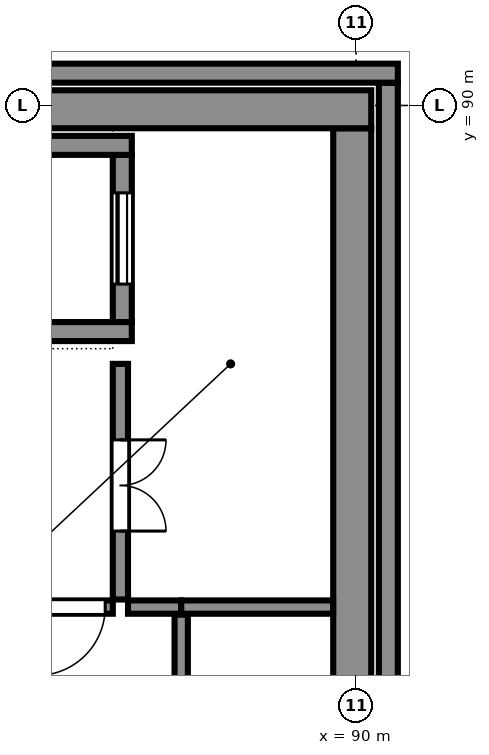
"""IFC4 building model, lengths in metres.
Left out: names, types, materials, properties, quantities, classifications, styles, units other than length and angle.
Written with IfcOpenShell. Run it as: python <this file> out.ifc"""

import sys

from ifc_helpers import new_model, si_unit, direction, frame, frame_2d, origin, place, context, subcontext, project, spatial, polyline, rectangle, outline, extrude, element, fill, save


model = new_model("IFC4")
c1 = context("Model", 3, precision=1e-05, world=origin(), true_north=direction((0.0, 1.0)))
c2 = subcontext(c1, "Body", "Model", "MODEL_VIEW")
j1 = project(units=[si_unit("LENGTHUNIT", "METRE"), si_unit("PLANEANGLEUNIT", "RADIAN")], contexts=[c1])
p1 = place(None, origin())
s1 = spatial("IfcSite", under=j1, at=p1, CompositionType="ELEMENT")
p2 = place(p1, origin())
s2 = spatial("IfcBuilding", under=s1, at=p2, CompositionType="ELEMENT")
p3 = place(p2, frame((0.0, 0.0, 11.7)))
s3 = spatial("IfcBuildingStorey", under=s2, at=p3, CompositionType="ELEMENT", Elevation=11.7)
p4 = place(p3, frame((71.8, 89.95, 0.0), z_axis=(0.0, 0.0, 1.0), x_axis=(1.0, 0.0, 0.0)))
e1 = element("IfcWall", 1, at=p4, inside=s3, PredefinedType="SOLIDWALL", context=c2, shape_type="SweptSolid", body=[
    extrude(rectangle(XDim=18.4, YDim=0.5, at=frame_2d((9.2, 0.0))), origin(), (0.0, 0.0, 1.0), 4.2),
])
p5 = place(p3, frame((89.95, 81.3, 0.0), z_axis=(0.0, 0.0, 1.0), x_axis=(0.0, 1.0, 0.0)))
e2 = element("IfcWall", 2, at=p5, inside=s3, PredefinedType="SOLIDWALL", context=c2, shape_type="SweptSolid", body=[
    extrude(rectangle(XDim=8.4, YDim=0.5, at=frame_2d((4.2, 0.0))), origin(), (0.0, 0.0, 1.0), 4.2),
])
p6 = place(p3, frame((71.45, 90.425, 0.0), z_axis=(0.0, 0.0, 1.0), x_axis=(1.0, 0.0, 0.0)))
e3 = element("IfcWall", 3, at=p6, inside=s3, PredefinedType="SOLIDWALL", context=c2, shape_type="SweptSolid", body=[
    extrude(outline(polyline([(0.0, 0.0), (19.1, 0.0), (19.1, 12.6), (0.0, 12.6), (0.0, 0.0)]), holes=[polyline([(1.308, 2.439), (1.352, 2.546), (1.408, 2.646), (1.475, 2.74), (1.552, 2.826), (1.638, 2.903), (1.732, 2.969), (1.833, 3.025), (1.939, 3.068), (2.05, 3.1), (2.161, 3.068), (2.267, 3.025), (2.368, 2.969), (2.462, 2.903), (2.549, 2.826), (2.625, 2.74), (2.692, 2.646), (2.748, 2.546), (2.792, 2.439), (2.824, 2.329), (2.844, 2.215), (2.85, 2.1), (2.85, 0.6), (1.25, 0.6), (1.25, 2.1), (1.257, 2.215), (1.276, 2.329), (1.308, 2.439)]), polyline([(4.308, 2.439), (4.352, 2.546), (4.408, 2.646), (4.475, 2.74), (4.552, 2.826), (4.638, 2.903), (4.732, 2.969), (4.833, 3.025), (4.939, 3.068), (5.05, 3.1), (5.161, 3.068), (5.267, 3.025), (5.368, 2.969), (5.462, 2.903), (5.549, 2.826), (5.625, 2.74), (5.692, 2.646), (5.748, 2.546), (5.792, 2.439), (5.824, 2.329), (5.844, 2.215), (5.85, 2.1), (5.85, 0.6), (4.25, 0.6), (4.25, 2.1), (4.257, 2.215), (4.276, 2.329), (4.308, 2.439)]), polyline([(7.308, 2.439), (7.352, 2.546), (7.408, 2.646), (7.475, 2.74), (7.552, 2.826), (7.638, 2.903), (7.732, 2.969), (7.833, 3.025), (7.939, 3.068), (8.05, 3.1), (8.161, 3.068), (8.267, 3.025), (8.368, 2.969), (8.462, 2.903), (8.549, 2.826), (8.625, 2.74), (8.692, 2.646), (8.748, 2.546), (8.792, 2.439), (8.824, 2.329), (8.844, 2.215), (8.85, 2.1), (8.85, 0.6), (7.25, 0.6), (7.25, 2.1), (7.257, 2.215), (7.276, 2.329), (7.308, 2.439)]), polyline([(1.308, 6.639), (1.352, 6.746), (1.408, 6.846), (1.475, 6.94), (1.552, 7.026), (1.638, 7.103), (1.732, 7.169), (1.833, 7.225), (1.939, 7.269), (2.05, 7.3), (2.161, 7.269), (2.267, 7.225), (2.368, 7.169), (2.462, 7.103), (2.549, 7.026), (2.625, 6.94), (2.692, 6.846), (2.748, 6.746), (2.792, 6.639), (2.824, 6.529), (2.844, 6.415), (2.85, 6.3), (2.85, 4.8), (1.25, 4.8), (1.25, 6.3), (1.257, 6.415), (1.276, 6.529), (1.308, 6.639)]), polyline([(4.308, 6.639), (4.352, 6.746), (4.408, 6.846), (4.475, 6.94), (4.552, 7.026), (4.638, 7.103), (4.732, 7.169), (4.833, 7.225), (4.939, 7.269), (5.05, 7.3), (5.161, 7.269), (5.267, 7.225), (5.368, 7.169), (5.462, 7.103), (5.549, 7.026), (5.625, 6.94), (5.692, 6.846), (5.748, 6.746), (5.792, 6.639), (5.824, 6.529), (5.844, 6.415), (5.85, 6.3), (5.85, 4.8), (4.25, 4.8), (4.25, 6.3), (4.257, 6.415), (4.276, 6.529), (4.308, 6.639)]), polyline([(7.308, 6.639), (7.352, 6.746), (7.408, 6.846), (7.475, 6.94), (7.552, 7.026), (7.638, 7.103), (7.732, 7.169), (7.833, 7.225), (7.939, 7.269), (8.05, 7.3), (8.161, 7.269), (8.267, 7.225), (8.368, 7.169), (8.462, 7.103), (8.549, 7.026), (8.625, 6.94), (8.692, 6.846), (8.748, 6.746), (8.792, 6.639), (8.824, 6.529), (8.844, 6.415), (8.85, 6.3), (8.85, 4.8), (7.25, 4.8), (7.25, 6.3), (7.257, 6.415), (7.276, 6.529), (7.308, 6.639)]), polyline([(1.308, 10.839), (1.352, 10.946), (1.408, 11.046), (1.475, 11.14), (1.552, 11.226), (1.638, 11.303), (1.732, 11.369), (1.833, 11.425), (1.939, 11.469), (2.05, 11.5), (2.161, 11.469), (2.267, 11.425), (2.368, 11.369), (2.462, 11.303), (2.549, 11.226), (2.625, 11.14), (2.692, 11.046), (2.748, 10.946), (2.792, 10.839), (2.824, 10.729), (2.844, 10.615), (2.85, 10.5), (2.85, 9.0), (1.25, 9.0), (1.25, 10.5), (1.257, 10.615), (1.276, 10.729), (1.308, 10.839)]), polyline([(4.352, 10.946), (4.408, 11.046), (4.475, 11.14), (4.552, 11.226), (4.638, 11.303), (4.732, 11.369), (4.833, 11.425), (4.939, 11.469), (5.05, 11.5), (5.161, 11.469), (5.267, 11.425), (5.368, 11.369), (5.462, 11.303), (5.549, 11.226), (5.625, 11.14), (5.692, 11.046), (5.748, 10.946), (5.792, 10.839), (5.824, 10.729), (5.844, 10.615), (5.85, 10.5), (5.85, 9.0), (4.25, 9.0), (4.25, 10.5), (4.257, 10.615), (4.276, 10.729), (4.308, 10.839), (4.352, 10.946)]), polyline([(7.352, 10.946), (7.408, 11.046), (7.475, 11.14), (7.552, 11.226), (7.638, 11.303), (7.732, 11.369), (7.833, 11.425), (7.939, 11.469), (8.05, 11.5), (8.161, 11.469), (8.267, 11.425), (8.368, 11.369), (8.462, 11.303), (8.549, 11.226), (8.625, 11.14), (8.692, 11.046), (8.748, 10.946), (8.792, 10.839), (8.824, 10.729), (8.844, 10.615), (8.85, 10.5), (8.85, 9.0), (7.25, 9.0), (7.25, 10.5), (7.257, 10.615), (7.276, 10.729), (7.308, 10.839), (7.352, 10.946)]), polyline([(10.308, 2.439), (10.352, 2.546), (10.408, 2.646), (10.475, 2.74), (10.552, 2.826), (10.638, 2.903), (10.732, 2.969), (10.833, 3.025), (10.939, 3.068), (11.05, 3.1), (11.161, 3.068), (11.267, 3.025), (11.368, 2.969), (11.462, 2.903), (11.549, 2.826), (11.625, 2.74), (11.692, 2.646), (11.748, 2.546), (11.792, 2.439), (11.824, 2.329), (11.844, 2.215), (11.85, 2.1), (11.85, 0.6), (10.25, 0.6), (10.25, 2.1), (10.257, 2.215), (10.276, 2.329), (10.308, 2.439)]), polyline([(13.308, 2.439), (13.352, 2.546), (13.408, 2.646), (13.475, 2.74), (13.552, 2.826), (13.638, 2.903), (13.732, 2.969), (13.833, 3.025), (13.939, 3.068), (14.05, 3.1), (14.161, 3.068), (14.267, 3.025), (14.368, 2.969), (14.462, 2.903), (14.549, 2.826), (14.625, 2.74), (14.692, 2.646), (14.748, 2.546), (14.792, 2.439), (14.824, 2.329), (14.844, 2.215), (14.85, 2.1), (14.85, 0.6), (13.25, 0.6), (13.25, 2.1), (13.257, 2.215), (13.276, 2.329), (13.308, 2.439)]), polyline([(16.308, 2.439), (16.352, 2.546), (16.408, 2.646), (16.475, 2.74), (16.552, 2.826), (16.638, 2.903), (16.732, 2.969), (16.833, 3.025), (16.939, 3.068), (17.05, 3.1), (17.161, 3.068), (17.267, 3.025), (17.368, 2.969), (17.462, 2.903), (17.549, 2.826), (17.625, 2.74), (17.692, 2.646), (17.748, 2.546), (17.792, 2.439), (17.824, 2.329), (17.844, 2.215), (17.85, 2.1), (17.85, 0.6), (16.25, 0.6), (16.25, 2.1), (16.257, 2.215), (16.276, 2.329), (16.308, 2.439)]), polyline([(10.308, 6.639), (10.352, 6.746), (10.408, 6.846), (10.475, 6.94), (10.552, 7.026), (10.638, 7.103), (10.732, 7.169), (10.833, 7.225), (10.939, 7.269), (11.05, 7.3), (11.161, 7.269), (11.267, 7.225), (11.368, 7.169), (11.462, 7.103), (11.549, 7.026), (11.625, 6.94), (11.692, 6.846), (11.748, 6.746), (11.792, 6.639), (11.824, 6.529), (11.844, 6.415), (11.85, 6.3), (11.85, 4.8), (10.25, 4.8), (10.25, 6.3), (10.257, 6.415), (10.276, 6.529), (10.308, 6.639)]), polyline([(13.308, 6.639), (13.352, 6.746), (13.408, 6.846), (13.475, 6.94), (13.552, 7.026), (13.638, 7.103), (13.732, 7.169), (13.833, 7.225), (13.939, 7.269), (14.05, 7.3), (14.161, 7.269), (14.267, 7.225), (14.368, 7.169), (14.462, 7.103), (14.549, 7.026), (14.625, 6.94), (14.692, 6.846), (14.748, 6.746), (14.792, 6.639), (14.824, 6.529), (14.844, 6.415), (14.85, 6.3), (14.85, 4.8), (13.25, 4.8), (13.25, 6.3), (13.257, 6.415), (13.276, 6.529), (13.308, 6.639)]), polyline([(16.308, 6.639), (16.352, 6.746), (16.408, 6.846), (16.475, 6.94), (16.552, 7.026), (16.638, 7.103), (16.732, 7.169), (16.833, 7.225), (16.939, 7.269), (17.05, 7.3), (17.161, 7.269), (17.267, 7.225), (17.368, 7.169), (17.462, 7.103), (17.549, 7.026), (17.625, 6.94), (17.692, 6.846), (17.748, 6.746), (17.792, 6.639), (17.824, 6.529), (17.844, 6.415), (17.85, 6.3), (17.85, 4.8), (16.25, 4.8), (16.25, 6.3), (16.257, 6.415), (16.276, 6.529), (16.308, 6.639)]), polyline([(10.308, 10.839), (10.352, 10.946), (10.408, 11.046), (10.475, 11.14), (10.552, 11.226), (10.638, 11.303), (10.732, 11.369), (10.833, 11.425), (10.939, 11.469), (11.05, 11.5), (11.161, 11.469), (11.267, 11.425), (11.368, 11.369), (11.462, 11.303), (11.549, 11.226), (11.625, 11.14), (11.692, 11.046), (11.748, 10.946), (11.792, 10.839), (11.824, 10.729), (11.844, 10.615), (11.85, 10.5), (11.85, 9.0), (10.25, 9.0), (10.25, 10.5), (10.257, 10.615), (10.276, 10.729), (10.308, 10.839)]), polyline([(13.352, 10.946), (13.408, 11.046), (13.475, 11.14), (13.552, 11.226), (13.638, 11.303), (13.732, 11.369), (13.833, 11.425), (13.939, 11.469), (14.05, 11.5), (14.161, 11.469), (14.267, 11.425), (14.368, 11.369), (14.462, 11.303), (14.549, 11.226), (14.625, 11.14), (14.692, 11.046), (14.748, 10.946), (14.792, 10.839), (14.824, 10.729), (14.844, 10.615), (14.85, 10.5), (14.85, 9.0), (13.25, 9.0), (13.25, 10.5), (13.257, 10.615), (13.276, 10.729), (13.308, 10.839), (13.352, 10.946)]), polyline([(16.352, 10.946), (16.408, 11.046), (16.475, 11.14), (16.552, 11.226), (16.638, 11.303), (16.732, 11.369), (16.833, 11.425), (16.939, 11.469), (17.05, 11.5), (17.161, 11.469), (17.267, 11.425), (17.368, 11.369), (17.462, 11.303), (17.549, 11.226), (17.625, 11.14), (17.692, 11.046), (17.748, 10.946), (17.792, 10.839), (17.824, 10.729), (17.844, 10.615), (17.85, 10.5), (17.85, 9.0), (16.25, 9.0), (16.25, 10.5), (16.257, 10.615), (16.276, 10.729), (16.308, 10.839), (16.352, 10.946)])]), frame((0.0, 0.125, 0.0), z_axis=(0.0, -1.0, 0.0), x_axis=(1.0, 0.0, 0.0)), (0.0, 0.0, 1.0), 0.25),
])
p7 = place(p3, frame((90.425, 81.6, 0.0), z_axis=(0.0, 0.0, 1.0), x_axis=(0.0, 1.0, 0.0)))
e4 = element("IfcWall", 4, at=p7, inside=s3, PredefinedType="SOLIDWALL", context=c2, shape_type="SweptSolid", body=[
    extrude(outline(polyline([(0.0, 0.0), (8.7, 0.0), (8.7, 12.6), (0.0, 12.6), (0.0, 0.0)]), holes=[polyline([(2.056, 2.215), (2.076, 2.329), (2.108, 2.439), (2.152, 2.546), (2.208, 2.646), (2.275, 2.74), (2.352, 2.826), (2.438, 2.903), (2.532, 2.969), (2.633, 3.025), (2.739, 3.068), (2.85, 3.1), (2.961, 3.068), (3.067, 3.025), (3.168, 2.969), (3.262, 2.903), (3.348, 2.826), (3.425, 2.74), (3.492, 2.646), (3.548, 2.546), (3.592, 2.439), (3.624, 2.329), (3.644, 2.215), (3.65, 2.1), (3.65, 0.6), (2.05, 0.6), (2.05, 2.1), (2.056, 2.215)]), polyline([(5.076, 2.329), (5.108, 2.439), (5.152, 2.546), (5.208, 2.646), (5.275, 2.74), (5.352, 2.826), (5.438, 2.903), (5.532, 2.969), (5.633, 3.025), (5.739, 3.068), (5.85, 3.1), (5.961, 3.068), (6.067, 3.025), (6.168, 2.969), (6.262, 2.903), (6.348, 2.826), (6.425, 2.74), (6.492, 2.646), (6.548, 2.546), (6.592, 2.439), (6.624, 2.329), (6.644, 2.215), (6.65, 2.1), (6.65, 0.6), (5.05, 0.6), (5.05, 2.1), (5.056, 2.215), (5.076, 2.329)]), polyline([(2.076, 6.529), (2.108, 6.639), (2.152, 6.746), (2.208, 6.846), (2.275, 6.94), (2.352, 7.026), (2.438, 7.103), (2.532, 7.169), (2.633, 7.225), (2.739, 7.269), (2.85, 7.3), (2.961, 7.269), (3.067, 7.225), (3.168, 7.169), (3.262, 7.103), (3.348, 7.026), (3.425, 6.94), (3.492, 6.846), (3.548, 6.746), (3.592, 6.639), (3.624, 6.529), (3.644, 6.415), (3.65, 6.3), (3.65, 4.8), (2.05, 4.8), (2.05, 6.3), (2.056, 6.415), (2.076, 6.529)]), polyline([(5.056, 6.415), (5.076, 6.529), (5.108, 6.639), (5.152, 6.746), (5.208, 6.846), (5.275, 6.94), (5.352, 7.026), (5.438, 7.103), (5.532, 7.169), (5.633, 7.225), (5.739, 7.269), (5.85, 7.3), (5.961, 7.269), (6.067, 7.225), (6.168, 7.169), (6.262, 7.103), (6.348, 7.026), (6.425, 6.94), (6.492, 6.846), (6.548, 6.746), (6.592, 6.639), (6.624, 6.529), (6.644, 6.415), (6.65, 6.3), (6.65, 4.8), (5.05, 4.8), (5.05, 6.3), (5.056, 6.415)]), polyline([(2.076, 10.729), (2.108, 10.839), (2.152, 10.946), (2.208, 11.046), (2.275, 11.14), (2.352, 11.226), (2.438, 11.303), (2.532, 11.369), (2.633, 11.425), (2.739, 11.469), (2.85, 11.5), (2.961, 11.469), (3.067, 11.425), (3.168, 11.369), (3.262, 11.303), (3.348, 11.226), (3.425, 11.14), (3.492, 11.046), (3.548, 10.946), (3.592, 10.839), (3.624, 10.729), (3.644, 10.615), (3.65, 10.5), (3.65, 9.0), (2.05, 9.0), (2.05, 10.5), (2.056, 10.615), (2.076, 10.729)]), polyline([(5.076, 10.729), (5.108, 10.839), (5.152, 10.946), (5.208, 11.046), (5.275, 11.14), (5.352, 11.226), (5.438, 11.303), (5.532, 11.369), (5.633, 11.425), (5.739, 11.469), (5.85, 11.5), (5.961, 11.469), (6.067, 11.425), (6.168, 11.369), (6.262, 11.303), (6.348, 11.226), (6.425, 11.14), (6.492, 11.046), (6.548, 10.946), (6.592, 10.839), (6.624, 10.729), (6.644, 10.615), (6.65, 10.5), (6.65, 9.0), (5.05, 9.0), (5.05, 10.5), (5.056, 10.615), (5.076, 10.729)])]), frame((0.0, 0.125, 0.0), z_axis=(0.0, -1.0, 0.0), x_axis=(1.0, 0.0, 0.0)), (0.0, 0.0, 1.0), 0.25),
])
for number, where, z_axis, x_axis in (
    (5, (83.65, 87.025, 0.0), (0.0, 0.0, 1.0), (1.0, 0.0, 0.0)),
    (6, (83.65, 89.475, 0.0), (0.0, 0.0, 1.0), (1.0, 0.0, 0.0)),
):
    element("IfcWall", number, at=place(p3, frame(where, z_axis=z_axis, x_axis=x_axis)), inside=s3, PredefinedType="SOLIDWALL", context=c2, shape_type="SweptSolid", body=[
        extrude(rectangle(XDim=3.4, YDim=0.25, at=frame_2d((1.7, 0.0))), origin(), (0.0, 0.0, 1.0), 3.516),
    ])
p8 = place(p3, frame((86.925, 87.15, 0.0), z_axis=(0.0, 0.0, 1.0), x_axis=(0.0, 1.0, 0.0)))
e7 = element("IfcWall", 7, at=p8, inside=s3, PredefinedType="SOLIDWALL", context=c2, shape_type="SweptSolid", body=[
    extrude(rectangle(XDim=2.2, YDim=0.25, at=frame_2d((1.1, 0.0))), origin(), (0.0, 0.0, 1.0), 3.516),
])
p9 = place(p8, frame((0.5, 0.0, 0.0)))
e8 = element("IfcOpeningElement", 8, at=p9, cuts=e7, PredefinedType="OPENING", context=c2, shape_type="SweptSolid", body=[
    extrude(rectangle(XDim=1.2, YDim=2.1, at=frame_2d((0.6, 1.05))), frame((0.0, 0.135, 0.0), z_axis=(0.0, -1.0, 0.0), x_axis=(1.0, 0.0, 0.0)), (0.0, 0.0, 1.0), 0.27),
])
p10 = place(p3, frame((86.8, 83.4, 0.0), z_axis=(0.0, 0.0, 1.0), x_axis=(-1.0, 0.0, 0.0)))
e9 = element("IfcWall", 9, at=p10, inside=s3, PredefinedType="PARTITIONING", context=c2, shape_type="SweptSolid", body=[
    extrude(rectangle(XDim=1.1, YDim=0.175, at=frame_2d((0.55, 0.0))), origin(), (0.0, 0.0, 1.0), 3.307),
])
p11 = place(p10, frame((0.1, 0.0, 0.0)))
e10 = element("IfcOpeningElement", 10, at=p11, cuts=e9, PredefinedType="OPENING", context=c2, shape_type="SweptSolid", body=[
    extrude(rectangle(XDim=0.9, YDim=2.1, at=frame_2d((0.45, 1.05))), frame((0.0, 0.097, 0.0), z_axis=(0.0, -1.0, 0.0), x_axis=(1.0, 0.0, 0.0)), (0.0, 0.0, 1.0), 0.195),
])
p12 = place(p3, frame((86.9, 86.6, 0.0), z_axis=(0.0, 0.0, 1.0), x_axis=(0.0, -1.0, 0.0)))
e11 = element("IfcWall", 11, at=p12, inside=s3, PredefinedType="PARTITIONING", context=c2, shape_type="SweptSolid", body=[
    extrude(rectangle(XDim=3.1, YDim=0.2, at=frame_2d((1.55, 0.0))), origin(), (0.0, 0.0, 1.0), 3.382),
])
p13 = place(p12, frame((1.0, 0.0, 0.0)))
e12 = element("IfcOpeningElement", 12, at=p13, cuts=e11, PredefinedType="OPENING", context=c2, shape_type="SweptSolid", body=[
    extrude(rectangle(XDim=1.2, YDim=2.1, at=frame_2d((0.6, 1.05))), frame((0.0, 0.11, 0.0), z_axis=(0.0, -1.0, 0.0), x_axis=(1.0, 0.0, 0.0)), (0.0, 0.0, 1.0), 0.22),
])
p14 = place(p3, frame((87.7, 83.4, 0.0), z_axis=(0.0, 0.0, 1.0), x_axis=(-1.0, 0.0, 0.0)))
e13 = element("IfcWall", 13, at=p14, inside=s3, PredefinedType="PARTITIONING", context=c2, shape_type="SweptSolid", body=[
    extrude(rectangle(XDim=0.7, YDim=0.175, at=frame_2d((0.35, 0.0))), origin(), (0.0, 0.0, 1.0), 3.307),
])
for number, where, z_axis, x_axis in (
    (14, (89.698, 83.4, 0.0), (0.0, 0.0, 1.0), (-1.0, 0.0, 0.0)),
    (15, (87.7, 83.3, 0.0), (0.0, 0.0, 1.0), (0.0, -1.0, 0.0)),
):
    element("IfcWall", number, at=place(p3, frame(where, z_axis=z_axis, x_axis=x_axis)), inside=s3, PredefinedType="PARTITIONING", context=c2, shape_type="SweptSolid", body=[
        extrude(rectangle(XDim=1.998, YDim=0.175, at=frame_2d((0.999, 0.0))), origin(), (0.0, 0.0, 1.0), 3.307),
    ])
p15 = place(p9, origin())
e16 = element("IfcDoor", 16, at=p15, inside=s3, OperationType="SLIDING_TO_LEFT", PredefinedType="DOOR", context=c2, shape_type="SweptSolid", body=[
    extrude(outline(polyline([(0.0, 0.0), (0.07, 0.0), (0.07, 2.03), (1.13, 2.03), (1.13, 0.0), (1.2, 0.0), (1.2, 2.1), (0.0, 2.1), (0.0, 0.0)])), frame((0.0, 0.025, 0.0), z_axis=(0.0, -1.0, 0.0), x_axis=(1.0, 0.0, 0.0)), (0.0, 0.0, 1.0), 0.05),
    extrude(rectangle(XDim=0.579, YDim=2.016, at=frame_2d((0.363, 1.018))), frame((0.0, 0.018, 0.0), z_axis=(0.0, -1.0, 0.0), x_axis=(1.0, 0.0, 0.0)), (0.0, 0.0, 1.0), 0.016),
    extrude(rectangle(XDim=0.575, YDim=2.016, at=frame_2d((0.839, 1.018))), frame((0.0, -0.002, 0.0), z_axis=(0.0, -1.0, 0.0), x_axis=(1.0, 0.0, 0.0)), (0.0, 0.0, 1.0), 0.016),
])
fill(e8, e16)
p16 = place(p13, origin())
e17 = element("IfcDoor", 17, at=p16, inside=s3, OperationType="DOUBLE_DOOR_SINGLE_SWING", PredefinedType="DOOR", context=c2, shape_type="SweptSolid", body=[
    extrude(outline(polyline([(0.0, 0.0), (0.07, 0.0), (0.07, 2.03), (1.13, 2.03), (1.13, 0.0), (1.2, 0.0), (1.2, 2.1), (0.0, 2.1), (0.0, 0.0)])), frame((0.0, 0.025, 0.0), z_axis=(0.0, -1.0, 0.0), x_axis=(1.0, 0.0, 0.0)), (0.0, 0.0, 1.0), 0.05),
    extrude(outline(polyline([(0.074, 0.01), (0.597, 0.01), (0.597, 2.026), (0.074, 2.026), (0.074, 0.01)]), holes=[polyline([(0.178, 0.373), (0.492, 0.373), (0.492, 1.784), (0.178, 1.784), (0.178, 0.373)])]), frame((0.0, 0.017, 0.0), z_axis=(0.0, -1.0, 0.0), x_axis=(1.0, 0.0, 0.0)), (0.0, 0.0, 1.0), 0.035),
    extrude(rectangle(XDim=0.314, YDim=1.411, at=frame_2d((0.335, 1.079))), frame((0.0, 0.009, 0.0), z_axis=(0.0, -1.0, 0.0), x_axis=(1.0, 0.0, 0.0)), (0.0, 0.0, 1.0), 0.017),
    extrude(outline(polyline([(0.603, 0.01), (1.126, 0.01), (1.126, 2.026), (0.603, 2.026), (0.603, 0.01)]), holes=[polyline([(0.708, 0.373), (1.021, 0.373), (1.021, 1.784), (0.708, 1.784), (0.708, 0.373)])]), frame((0.0, 0.017, 0.0), z_axis=(0.0, -1.0, 0.0), x_axis=(1.0, 0.0, 0.0)), (0.0, 0.0, 1.0), 0.035),
    extrude(rectangle(XDim=0.314, YDim=1.411, at=frame_2d((0.865, 1.079))), frame((0.0, 0.009, 0.0), z_axis=(0.0, -1.0, 0.0), x_axis=(1.0, 0.0, 0.0)), (0.0, 0.0, 1.0), 0.017),
])
fill(e12, e17)
p17 = place(p11, origin())
e18 = element("IfcDoor", 18, at=p17, inside=s3, OperationType="SINGLE_SWING_RIGHT", PredefinedType="DOOR", context=c2, shape_type="SweptSolid", body=[
    extrude(outline(polyline([(0.0, 0.0), (0.07, 0.0), (0.07, 2.03), (0.83, 2.03), (0.83, 0.0), (0.9, 0.0), (0.9, 2.1), (0.0, 2.1), (0.0, 0.0)])), frame((0.0, 0.025, 0.0), z_axis=(0.0, -1.0, 0.0), x_axis=(1.0, 0.0, 0.0)), (0.0, 0.0, 1.0), 0.05),
    extrude(outline(polyline([(0.074, 0.01), (0.826, 0.01), (0.826, 2.026), (0.074, 2.026), (0.074, 0.01)]), holes=[polyline([(0.194, 0.16), (0.706, 0.16), (0.706, 1.01), (0.194, 1.01), (0.194, 0.16)]), polyline([(0.3, 1.16), (0.6, 1.16), (0.6, 1.76), (0.3, 1.76), (0.3, 1.16)])]), frame((0.0, 0.017, 0.0), z_axis=(0.0, -1.0, 0.0), x_axis=(1.0, 0.0, 0.0)), (0.0, 0.0, 1.0), 0.035),
    extrude(rectangle(XDim=0.512, YDim=0.85, at=frame_2d((0.45, 0.585))), frame((0.0, 0.009, 0.0), z_axis=(0.0, -1.0, 0.0), x_axis=(1.0, 0.0, 0.0)), (0.0, 0.0, 1.0), 0.017),
    extrude(rectangle(XDim=0.3, YDim=0.6, at=frame_2d((0.45, 1.46))), frame((0.0, 0.006, 0.0), z_axis=(0.0, -1.0, 0.0), x_axis=(1.0, 0.0, 0.0)), (0.0, 0.0, 1.0), 0.012),
])
fill(e10, e18)
save(model, sys.argv[1])
